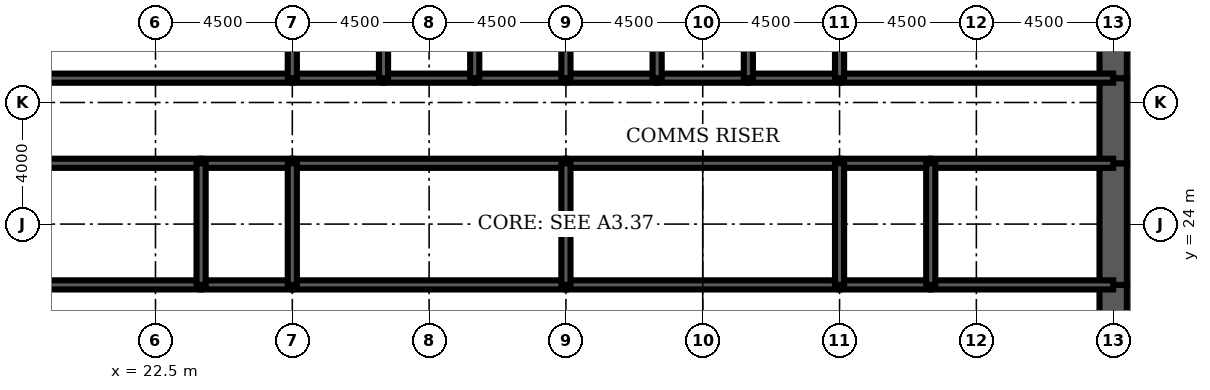
"""IFC4 building model, lengths in metres.
Left out: names, types, materials, properties, quantities, classifications, styles, units other than length and angle.
Written with IfcOpenShell. Run it as: python <this file> out.ifc"""

import sys

from ifc_helpers import new_model, si_unit, direction, frame, frame_2d, origin, place, context, subcontext, project, spatial, rectangle, extrude, element, fill, save


model = new_model("IFC4")
c1 = context("Model", 3, precision=1e-05, world=origin(), true_north=direction((0.0, 1.0)))
c2 = subcontext(c1, "Body", "Model", "MODEL_VIEW")
j1 = project(units=[si_unit("LENGTHUNIT", "METRE"), si_unit("PLANEANGLEUNIT", "RADIAN")], contexts=[c1])
p1 = place(None, origin())
s1 = spatial("IfcSite", under=j1, at=p1, CompositionType="ELEMENT")
p2 = place(p1, origin())
s2 = spatial("IfcBuilding", under=s1, at=p2, CompositionType="ELEMENT")
p3 = place(p2, frame((0.0, 0.0, 159.3)))
s3 = spatial("IfcBuildingStorey", under=s2, at=p3, CompositionType="ELEMENT", Elevation=159.3)
p4 = place(p3, frame((54.0, 19.2, 0.0), z_axis=(0.0, 0.0, 1.0), x_axis=(0.0, 1.0, 0.0)))
e1 = element("IfcWall", 1, at=p4, inside=s3, PredefinedType="SHEAR", context=c2, shape_type="SweptSolid", body=[
    extrude(rectangle(XDim=2.8, YDim=0.9, at=frame_2d((1.4, 0.0))), origin(), (0.0, 0.0, 1.0), 4.2),
])
p5 = place(p4, frame((0.4, 0.0, 0.0)))
e2 = element("IfcOpeningElement", 2, at=p5, cuts=e1, PredefinedType="OPENING", context=c2, shape_type="SweptSolid", body=[
    extrude(rectangle(XDim=1.8, YDim=2.1, at=frame_2d((0.9, 1.05))), frame((0.0, 0.46, 0.0), z_axis=(0.0, -1.0, 0.0), x_axis=(1.0, 0.0, 0.0)), (0.0, 0.0, 1.0), 0.92),
])
p6 = place(p3, frame((54.0, 22.0, 0.0), z_axis=(0.0, 0.0, 1.0), x_axis=(0.0, 1.0, 0.0)))
e3 = element("IfcWall", 3, at=p6, inside=s3, PredefinedType="SHEAR", context=c2, shape_type="SweptSolid", body=[
    extrude(rectangle(XDim=4.0, YDim=0.9, at=frame_2d((2.0, 0.0))), origin(), (0.0, 0.0, 1.0), 4.2),
])
p7 = place(p3, frame((54.0, 26.0, 0.0), z_axis=(0.0, 0.0, 1.0), x_axis=(0.0, 1.0, 0.0)))
e4 = element("IfcWall", 4, at=p7, inside=s3, PredefinedType="SHEAR", context=c2, shape_type="SweptSolid", body=[
    extrude(rectangle(XDim=2.8, YDim=0.9, at=frame_2d((1.4, 0.0))), origin(), (0.0, 0.0, 1.0), 4.2),
])
p8 = place(p7, frame((0.6, 0.0, 0.0)))
e5 = element("IfcOpeningElement", 5, at=p8, cuts=e4, PredefinedType="OPENING", context=c2, shape_type="SweptSolid", body=[
    extrude(rectangle(XDim=1.8, YDim=2.1, at=frame_2d((0.9, 1.05))), frame((0.0, 0.46, 0.0), z_axis=(0.0, -1.0, 0.0), x_axis=(1.0, 0.0, 0.0)), (0.0, 0.0, 1.0), 0.92),
])
p9 = place(p3, frame((54.0, 28.8, 0.0), z_axis=(0.0, 0.0, 1.0), x_axis=(0.0, 1.0, 0.0)))
e6 = element("IfcWall", 6, at=p9, inside=s3, PredefinedType="SHEAR", context=c2, shape_type="SweptSolid", body=[
    extrude(rectangle(XDim=3.2, YDim=0.9, at=frame_2d((1.6, 0.0))), origin(), (0.0, 0.0, 1.0), 4.2),
])
p10 = place(p3, frame((18.0, 28.8, 0.0), z_axis=(0.0, 0.0, 1.0), x_axis=(1.0, 0.0, 0.0)))
e7 = element("IfcWall", 7, at=p10, inside=s3, PredefinedType="SOLIDWALL", context=c2, shape_type="SweptSolid", body=[
    extrude(rectangle(XDim=9.0, YDim=0.3, at=frame_2d((4.5, 0.0))), origin(), (0.0, 0.0, 1.0), 4.2),
])
p11 = place(p10, frame((0.65, 0.0, 0.0)))
e8 = element("IfcOpeningElement", 8, at=p11, cuts=e7, PredefinedType="OPENING", context=c2, shape_type="SweptSolid", body=[
    extrude(rectangle(XDim=1.0, YDim=2.1, at=frame_2d((0.5, 1.05))), frame((0.0, 0.16, 0.0), z_axis=(0.0, -1.0, 0.0), x_axis=(1.0, 0.0, 0.0)), (0.0, 0.0, 1.0), 0.32),
])
p12 = place(p3, frame((27.0, 28.8, 0.0), z_axis=(0.0, 0.0, 1.0), x_axis=(1.0, 0.0, 0.0)))
e9 = element("IfcWall", 9, at=p12, inside=s3, PredefinedType="SOLIDWALL", context=c2, shape_type="SweptSolid", body=[
    extrude(rectangle(XDim=3.0, YDim=0.3, at=frame_2d((1.5, 0.0))), origin(), (0.0, 0.0, 1.0), 4.2),
])
p13 = place(p12, frame((0.95, 0.0, 0.0)))
e10 = element("IfcOpeningElement", 10, at=p13, cuts=e9, PredefinedType="OPENING", context=c2, shape_type="SweptSolid", body=[
    extrude(rectangle(XDim=1.1, YDim=2.2, at=frame_2d((0.55, 1.1))), frame((0.0, 0.16, 0.0), z_axis=(0.0, -1.0, 0.0), x_axis=(1.0, 0.0, 0.0)), (0.0, 0.0, 1.0), 0.32),
])
p14 = place(p3, frame((30.0, 28.8, 0.0), z_axis=(0.0, 0.0, 1.0), x_axis=(1.0, 0.0, 0.0)))
e11 = element("IfcWall", 11, at=p14, inside=s3, PredefinedType="SOLIDWALL", context=c2, shape_type="SweptSolid", body=[
    extrude(rectangle(XDim=3.0, YDim=0.3, at=frame_2d((1.5, 0.0))), origin(), (0.0, 0.0, 1.0), 4.2),
])
p15 = place(p14, frame((0.95, 0.0, 0.0)))
e12 = element("IfcOpeningElement", 12, at=p15, cuts=e11, PredefinedType="OPENING", context=c2, shape_type="SweptSolid", body=[
    extrude(rectangle(XDim=1.1, YDim=2.2, at=frame_2d((0.55, 1.1))), frame((0.0, 0.16, 0.0), z_axis=(0.0, -1.0, 0.0), x_axis=(1.0, 0.0, 0.0)), (0.0, 0.0, 1.0), 0.32),
])
p16 = place(p3, frame((33.0, 28.8, 0.0), z_axis=(0.0, 0.0, 1.0), x_axis=(1.0, 0.0, 0.0)))
e13 = element("IfcWall", 13, at=p16, inside=s3, PredefinedType="SOLIDWALL", context=c2, shape_type="SweptSolid", body=[
    extrude(rectangle(XDim=3.0, YDim=0.3, at=frame_2d((1.5, 0.0))), origin(), (0.0, 0.0, 1.0), 4.2),
])
p17 = place(p16, frame((0.95, 0.0, 0.0)))
e14 = element("IfcOpeningElement", 14, at=p17, cuts=e13, PredefinedType="OPENING", context=c2, shape_type="SweptSolid", body=[
    extrude(rectangle(XDim=1.1, YDim=2.2, at=frame_2d((0.55, 1.1))), frame((0.0, 0.16, 0.0), z_axis=(0.0, -1.0, 0.0), x_axis=(1.0, 0.0, 0.0)), (0.0, 0.0, 1.0), 0.32),
])
for number, where, z_axis, x_axis in (
    (15, (36.0, 28.8, 0.0), (0.0, 0.0, 1.0), (1.0, 0.0, 0.0)),
    (16, (39.0, 28.8, 0.0), (0.0, 0.0, 1.0), (1.0, 0.0, 0.0)),
):
    element("IfcWall", number, at=place(p3, frame(where, z_axis=z_axis, x_axis=x_axis)), inside=s3, PredefinedType="SOLIDWALL", context=c2, shape_type="SweptSolid", body=[
        extrude(rectangle(XDim=3.0, YDim=0.3, at=frame_2d((1.5, 0.0))), origin(), (0.0, 0.0, 1.0), 4.2),
    ])
p18 = place(p3, frame((42.0, 28.8, 0.0), z_axis=(0.0, 0.0, 1.0), x_axis=(1.0, 0.0, 0.0)))
e17 = element("IfcWall", 17, at=p18, inside=s3, PredefinedType="SOLIDWALL", context=c2, shape_type="SweptSolid", body=[
    extrude(rectangle(XDim=3.0, YDim=0.3, at=frame_2d((1.5, 0.0))), origin(), (0.0, 0.0, 1.0), 4.2),
])
p19 = place(p18, frame((0.95, 0.0, 0.0)))
e18 = element("IfcOpeningElement", 18, at=p19, cuts=e17, PredefinedType="OPENING", context=c2, shape_type="SweptSolid", body=[
    extrude(rectangle(XDim=1.1, YDim=2.2, at=frame_2d((0.55, 1.1))), frame((0.0, 0.16, 0.0), z_axis=(0.0, -1.0, 0.0), x_axis=(1.0, 0.0, 0.0)), (0.0, 0.0, 1.0), 0.32),
])
p20 = place(p3, frame((45.0, 28.8, 0.0), z_axis=(0.0, 0.0, 1.0), x_axis=(1.0, 0.0, 0.0)))
e19 = element("IfcWall", 19, at=p20, inside=s3, PredefinedType="SOLIDWALL", context=c2, shape_type="SweptSolid", body=[
    extrude(rectangle(XDim=9.0, YDim=0.3, at=frame_2d((4.5, 0.0))), origin(), (0.0, 0.0, 1.0), 4.2),
])
p21 = place(p20, frame((7.35, 0.0, 0.0)))
e20 = element("IfcOpeningElement", 20, at=p21, cuts=e19, PredefinedType="OPENING", context=c2, shape_type="SweptSolid", body=[
    extrude(rectangle(XDim=1.0, YDim=2.1, at=frame_2d((0.5, 1.05))), frame((0.0, 0.16, 0.0), z_axis=(0.0, -1.0, 0.0), x_axis=(1.0, 0.0, 0.0)), (0.0, 0.0, 1.0), 0.32),
])
p22 = place(p3, frame((18.0, 22.0, 0.0), z_axis=(0.0, 0.0, 1.0), x_axis=(1.0, 0.0, 0.0)))
e21 = element("IfcWall", 21, at=p22, inside=s3, PredefinedType="SOLIDWALL", context=c2, shape_type="SweptSolid", body=[
    extrude(rectangle(XDim=6.0, YDim=0.3, at=frame_2d((3.0, 0.0))), origin(), (0.0, 0.0, 1.0), 4.2),
])
p23 = place(p22, frame((4.4, 0.0, 0.0)))
e22 = element("IfcOpeningElement", 22, at=p23, cuts=e21, PredefinedType="OPENING", context=c2, shape_type="SweptSolid", body=[
    extrude(rectangle(XDim=1.0, YDim=2.1, at=frame_2d((0.5, 1.05))), frame((0.0, 0.16, 0.0), z_axis=(0.0, -1.0, 0.0), x_axis=(1.0, 0.0, 0.0)), (0.0, 0.0, 1.0), 0.32),
])
p24 = place(p22, frame((0.7, 0.0, 0.0)))
e23 = element("IfcOpeningElement", 23, at=p24, cuts=e21, PredefinedType="OPENING", context=c2, shape_type="SweptSolid", body=[
    extrude(rectangle(XDim=1.0, YDim=2.1, at=frame_2d((0.5, 1.05))), frame((0.0, 0.16, 0.0), z_axis=(0.0, -1.0, 0.0), x_axis=(1.0, 0.0, 0.0)), (0.0, 0.0, 1.0), 0.32),
])
p25 = place(p3, frame((24.0, 22.0, 0.0), z_axis=(0.0, 0.0, 1.0), x_axis=(1.0, 0.0, 0.0)))
e24 = element("IfcWall", 24, at=p25, inside=s3, PredefinedType="SOLIDWALL", context=c2, shape_type="SweptSolid", body=[
    extrude(rectangle(XDim=3.0, YDim=0.3, at=frame_2d((1.5, 0.0))), origin(), (0.0, 0.0, 1.0), 4.2),
])
p26 = place(p25, frame((1.0, 0.0, 0.0)))
e25 = element("IfcOpeningElement", 25, at=p26, cuts=e24, PredefinedType="OPENING", context=c2, shape_type="SweptSolid", body=[
    extrude(rectangle(XDim=1.0, YDim=2.1, at=frame_2d((0.5, 1.05))), frame((0.0, 0.16, 0.0), z_axis=(0.0, -1.0, 0.0), x_axis=(1.0, 0.0, 0.0)), (0.0, 0.0, 1.0), 0.32),
])
p27 = place(p3, frame((27.0, 22.0, 0.0), z_axis=(0.0, 0.0, 1.0), x_axis=(1.0, 0.0, 0.0)))
e26 = element("IfcWall", 26, at=p27, inside=s3, PredefinedType="SOLIDWALL", context=c2, shape_type="SweptSolid", body=[
    extrude(rectangle(XDim=9.0, YDim=0.3, at=frame_2d((4.5, 0.0))), origin(), (0.0, 0.0, 1.0), 4.2),
])
p28 = place(p27, frame((4.0, 0.0, 0.0)))
e27 = element("IfcOpeningElement", 27, at=p28, cuts=e26, PredefinedType="OPENING", context=c2, shape_type="SweptSolid", body=[
    extrude(rectangle(XDim=1.0, YDim=2.1, at=frame_2d((0.5, 1.05))), frame((0.0, 0.16, 0.0), z_axis=(0.0, -1.0, 0.0), x_axis=(1.0, 0.0, 0.0)), (0.0, 0.0, 1.0), 0.32),
])
p29 = place(p3, frame((36.0, 22.0, 0.0), z_axis=(0.0, 0.0, 1.0), x_axis=(1.0, 0.0, 0.0)))
e28 = element("IfcWall", 28, at=p29, inside=s3, PredefinedType="SOLIDWALL", context=c2, shape_type="SweptSolid", body=[
    extrude(rectangle(XDim=9.0, YDim=0.3, at=frame_2d((4.5, 0.0))), origin(), (0.0, 0.0, 1.0), 4.2),
])
p30 = place(p29, frame((4.0, 0.0, 0.0)))
e29 = element("IfcOpeningElement", 29, at=p30, cuts=e28, PredefinedType="OPENING", context=c2, shape_type="SweptSolid", body=[
    extrude(rectangle(XDim=1.0, YDim=2.1, at=frame_2d((0.5, 1.05))), frame((0.0, 0.16, 0.0), z_axis=(0.0, -1.0, 0.0), x_axis=(1.0, 0.0, 0.0)), (0.0, 0.0, 1.0), 0.32),
])
p31 = place(p3, frame((45.0, 22.0, 0.0), z_axis=(0.0, 0.0, 1.0), x_axis=(1.0, 0.0, 0.0)))
e30 = element("IfcWall", 30, at=p31, inside=s3, PredefinedType="SOLIDWALL", context=c2, shape_type="SweptSolid", body=[
    extrude(rectangle(XDim=3.0, YDim=0.3, at=frame_2d((1.5, 0.0))), origin(), (0.0, 0.0, 1.0), 4.2),
])
p32 = place(p31, frame((1.0, 0.0, 0.0)))
e31 = element("IfcOpeningElement", 31, at=p32, cuts=e30, PredefinedType="OPENING", context=c2, shape_type="SweptSolid", body=[
    extrude(rectangle(XDim=1.0, YDim=2.1, at=frame_2d((0.5, 1.05))), frame((0.0, 0.16, 0.0), z_axis=(0.0, -1.0, 0.0), x_axis=(1.0, 0.0, 0.0)), (0.0, 0.0, 1.0), 0.32),
])
p33 = place(p3, frame((48.0, 22.0, 0.0), z_axis=(0.0, 0.0, 1.0), x_axis=(1.0, 0.0, 0.0)))
e32 = element("IfcWall", 32, at=p33, inside=s3, PredefinedType="SOLIDWALL", context=c2, shape_type="SweptSolid", body=[
    extrude(rectangle(XDim=6.0, YDim=0.3, at=frame_2d((3.0, 0.0))), origin(), (0.0, 0.0, 1.0), 4.2),
])
p34 = place(p33, frame((2.0, 0.0, 0.0)))
e33 = element("IfcOpeningElement", 33, at=p34, cuts=e32, PredefinedType="OPENING", context=c2, shape_type="SweptSolid", body=[
    extrude(rectangle(XDim=1.0, YDim=2.1, at=frame_2d((0.5, 1.05))), frame((0.0, 0.16, 0.0), z_axis=(0.0, -1.0, 0.0), x_axis=(1.0, 0.0, 0.0)), (0.0, 0.0, 1.0), 0.32),
])
p35 = place(p33, frame((4.0, 0.0, 0.0)))
e34 = element("IfcOpeningElement", 34, at=p35, cuts=e32, PredefinedType="OPENING", context=c2, shape_type="SweptSolid", body=[
    extrude(rectangle(XDim=1.0, YDim=2.1, at=frame_2d((0.5, 1.05))), frame((0.0, 0.16, 0.0), z_axis=(0.0, -1.0, 0.0), x_axis=(1.0, 0.0, 0.0)), (0.0, 0.0, 1.0), 0.32),
])
p36 = place(p3, frame((18.0, 26.0, 0.0), z_axis=(0.0, 0.0, 1.0), x_axis=(1.0, 0.0, 0.0)))
e35 = element("IfcWall", 35, at=p36, inside=s3, PredefinedType="SOLIDWALL", context=c2, shape_type="SweptSolid", body=[
    extrude(rectangle(XDim=6.0, YDim=0.3, at=frame_2d((3.0, 0.0))), origin(), (0.0, 0.0, 1.0), 4.2),
])
p37 = place(p3, frame((24.0, 26.0, 0.0), z_axis=(0.0, 0.0, 1.0), x_axis=(1.0, 0.0, 0.0)))
e36 = element("IfcWall", 36, at=p37, inside=s3, PredefinedType="SOLIDWALL", context=c2, shape_type="SweptSolid", body=[
    extrude(rectangle(XDim=3.0, YDim=0.3, at=frame_2d((1.5, 0.0))), origin(), (0.0, 0.0, 1.0), 4.2),
])
for number, where, z_axis, x_axis in (
    (37, (27.0, 26.0, 0.0), (0.0, 0.0, 1.0), (1.0, 0.0, 0.0)),
    (38, (36.0, 26.0, 0.0), (0.0, 0.0, 1.0), (1.0, 0.0, 0.0)),
):
    element("IfcWall", number, at=place(p3, frame(where, z_axis=z_axis, x_axis=x_axis)), inside=s3, PredefinedType="SOLIDWALL", context=c2, shape_type="SweptSolid", body=[
        extrude(rectangle(XDim=9.0, YDim=0.3, at=frame_2d((4.5, 0.0))), origin(), (0.0, 0.0, 1.0), 4.2),
    ])
p38 = place(p3, frame((45.0, 26.0, 0.0), z_axis=(0.0, 0.0, 1.0), x_axis=(1.0, 0.0, 0.0)))
e39 = element("IfcWall", 39, at=p38, inside=s3, PredefinedType="SOLIDWALL", context=c2, shape_type="SweptSolid", body=[
    extrude(rectangle(XDim=3.0, YDim=0.3, at=frame_2d((1.5, 0.0))), origin(), (0.0, 0.0, 1.0), 4.2),
])
p39 = place(p3, frame((48.0, 26.0, 0.0), z_axis=(0.0, 0.0, 1.0), x_axis=(1.0, 0.0, 0.0)))
e40 = element("IfcWall", 40, at=p39, inside=s3, PredefinedType="SOLIDWALL", context=c2, shape_type="SweptSolid", body=[
    extrude(rectangle(XDim=6.0, YDim=0.3, at=frame_2d((3.0, 0.0))), origin(), (0.0, 0.0, 1.0), 4.2),
])
for number, where, z_axis, x_axis in (
    (41, (27.0, 28.8, 0.0), (0.0, 0.0, 1.0), (0.0, 1.0, 0.0)),
    (42, (30.0, 28.8, 0.0), (0.0, 0.0, 1.0), (0.0, 1.0, 0.0)),
    (43, (33.0, 28.8, 0.0), (0.0, 0.0, 1.0), (0.0, 1.0, 0.0)),
    (44, (36.0, 28.8, 0.0), (0.0, 0.0, 1.0), (0.0, 1.0, 0.0)),
    (45, (39.0, 28.8, 0.0), (0.0, 0.0, 1.0), (0.0, 1.0, 0.0)),
    (46, (42.0, 28.8, 0.0), (0.0, 0.0, 1.0), (0.0, 1.0, 0.0)),
    (47, (45.0, 28.8, 0.0), (0.0, 0.0, 1.0), (0.0, 1.0, 0.0)),
):
    element("IfcWall", number, at=place(p3, frame(where, z_axis=z_axis, x_axis=x_axis)), inside=s3, PredefinedType="SOLIDWALL", context=c2, shape_type="SweptSolid", body=[
        extrude(rectangle(XDim=3.2, YDim=0.3, at=frame_2d((1.6, 0.0))), origin(), (0.0, 0.0, 1.0), 4.2),
    ])
for number, where, z_axis, x_axis in (
    (48, (24.0, 22.0, 0.0), (0.0, 0.0, 1.0), (0.0, 1.0, 0.0)),
    (49, (27.0, 22.0, 0.0), (0.0, 0.0, 1.0), (0.0, 1.0, 0.0)),
    (50, (36.0, 22.0, 0.0), (0.0, 0.0, 1.0), (0.0, 1.0, 0.0)),
    (51, (45.0, 22.0, 0.0), (0.0, 0.0, 1.0), (0.0, 1.0, 0.0)),
    (52, (48.0, 22.0, 0.0), (0.0, 0.0, 1.0), (0.0, 1.0, 0.0)),
):
    element("IfcWall", number, at=place(p3, frame(where, z_axis=z_axis, x_axis=x_axis)), inside=s3, PredefinedType="SOLIDWALL", context=c2, shape_type="SweptSolid", body=[
        extrude(rectangle(XDim=4.0, YDim=0.3, at=frame_2d((2.0, 0.0))), origin(), (0.0, 0.0, 1.0), 4.2),
    ])
for number, where, z_axis, x_axis in (
    (53, (20.025, 22.15, 0.0), (0.0, 0.0, 1.0), (0.0, 1.0, 0.0)),
    (54, (51.375, 22.15, 0.0), (0.0, 0.0, 1.0), (0.0, 1.0, 0.0)),
):
    element("IfcWall", number, at=place(p3, frame(where, z_axis=z_axis, x_axis=x_axis)), inside=s3, PredefinedType="PARTITIONING", context=c2, shape_type="SweptSolid", body=[
        extrude(rectangle(XDim=3.7, YDim=0.15, at=frame_2d((1.85, 0.0))), origin(), (0.0, 0.0, 1.0), 3.0),
    ])
p40 = place(p3, frame((23.7, 26.15, 0.0), z_axis=(0.0, 0.0, 1.0), x_axis=(0.0, 1.0, 0.0)))
e55 = element("IfcWall", 55, at=p40, inside=s3, PredefinedType="PARTITIONING", context=c2, shape_type="SweptSolid", body=[
    extrude(rectangle(XDim=2.5, YDim=0.15, at=frame_2d((1.25, 0.0))), origin(), (0.0, 0.0, 1.0), 3.0),
])
p41 = place(p40, frame((0.35, 0.0, 0.0)))
e56 = element("IfcOpeningElement", 56, at=p41, cuts=e55, PredefinedType="OPENING", context=c2, shape_type="SweptSolid", body=[
    extrude(rectangle(XDim=1.0, YDim=2.1, at=frame_2d((0.5, 1.05))), frame((0.0, 0.085, 0.0), z_axis=(0.0, -1.0, 0.0), x_axis=(1.0, 0.0, 0.0)), (0.0, 0.0, 1.0), 0.17),
])
p42 = place(p41, origin())
e57 = element("IfcDoor", 57, at=p42, inside=s3, OperationType="SINGLE_SWING_LEFT", PredefinedType="DOOR", context=c2, shape_type="SweptSolid", body=[
    extrude(rectangle(XDim=1.0, YDim=2.1, at=frame_2d((0.5, 1.05))), frame((0.0, 0.025, 0.0), z_axis=(0.0, -1.0, 0.0), x_axis=(1.0, 0.0, 0.0)), (0.0, 0.0, 1.0), 0.05),
])
fill(e56, e57)
p43 = place(p19, origin())
e58 = element("IfcDoor", 58, at=p43, inside=s3, OperationType="DOUBLE_DOOR_SLIDING", PredefinedType="USERDEFINED", context=c2, shape_type="SweptSolid", body=[
    extrude(rectangle(XDim=1.1, YDim=2.2, at=frame_2d((0.55, 1.1))), frame((0.0, 0.025, 0.0), z_axis=(0.0, -1.0, 0.0), x_axis=(1.0, 0.0, 0.0)), (0.0, 0.0, 1.0), 0.05),
])
fill(e18, e58)
p44 = place(p13, origin())
e59 = element("IfcDoor", 59, at=p44, inside=s3, OperationType="DOUBLE_DOOR_SLIDING", PredefinedType="USERDEFINED", context=c2, shape_type="SweptSolid", body=[
    extrude(rectangle(XDim=1.1, YDim=2.2, at=frame_2d((0.55, 1.1))), frame((0.0, 0.025, 0.0), z_axis=(0.0, -1.0, 0.0), x_axis=(1.0, 0.0, 0.0)), (0.0, 0.0, 1.0), 0.05),
])
fill(e10, e59)
p45 = place(p15, origin())
e60 = element("IfcDoor", 60, at=p45, inside=s3, OperationType="DOUBLE_DOOR_SLIDING", PredefinedType="USERDEFINED", context=c2, shape_type="SweptSolid", body=[
    extrude(rectangle(XDim=1.1, YDim=2.2, at=frame_2d((0.55, 1.1))), frame((0.0, 0.025, 0.0), z_axis=(0.0, -1.0, 0.0), x_axis=(1.0, 0.0, 0.0)), (0.0, 0.0, 1.0), 0.05),
])
fill(e12, e60)
p46 = place(p17, origin())
e61 = element("IfcDoor", 61, at=p46, inside=s3, OperationType="DOUBLE_DOOR_SLIDING", PredefinedType="USERDEFINED", context=c2, shape_type="SweptSolid", body=[
    extrude(rectangle(XDim=1.1, YDim=2.2, at=frame_2d((0.55, 1.1))), frame((0.0, 0.025, 0.0), z_axis=(0.0, -1.0, 0.0), x_axis=(1.0, 0.0, 0.0)), (0.0, 0.0, 1.0), 0.05),
])
fill(e14, e61)
p47 = place(p11, origin())
e62 = element("IfcDoor", 62, at=p47, inside=s3, OperationType="SINGLE_SWING_LEFT", PredefinedType="DOOR", context=c2, shape_type="SweptSolid", body=[
    extrude(rectangle(XDim=1.0, YDim=2.1, at=frame_2d((0.5, 1.05))), frame((0.0, 0.025, 0.0), z_axis=(0.0, -1.0, 0.0), x_axis=(1.0, 0.0, 0.0)), (0.0, 0.0, 1.0), 0.05),
])
fill(e8, e62)
p48 = place(p21, origin())
e63 = element("IfcDoor", 63, at=p48, inside=s3, OperationType="SINGLE_SWING_RIGHT", PredefinedType="DOOR", context=c2, shape_type="SweptSolid", body=[
    extrude(rectangle(XDim=1.0, YDim=2.1, at=frame_2d((0.5, 1.05))), frame((0.0, 0.025, 0.0), z_axis=(0.0, -1.0, 0.0), x_axis=(1.0, 0.0, 0.0)), (0.0, 0.0, 1.0), 0.05),
])
fill(e20, e63)
p49 = place(p5, origin())
e64 = element("IfcDoor", 64, at=p49, inside=s3, OperationType="SINGLE_SWING_LEFT", PredefinedType="DOOR", context=c2, shape_type="SweptSolid", body=[
    extrude(rectangle(XDim=1.8, YDim=2.1, at=frame_2d((0.9, 1.05))), frame((0.0, 0.45, 0.0), z_axis=(0.0, -1.0, 0.0), x_axis=(1.0, 0.0, 0.0)), (0.0, 0.0, 1.0), 0.899),
])
fill(e2, e64)
p50 = place(p8, origin())
e65 = element("IfcDoor", 65, at=p50, inside=s3, OperationType="SINGLE_SWING_LEFT", PredefinedType="DOOR", context=c2, shape_type="SweptSolid", body=[
    extrude(rectangle(XDim=1.8, YDim=2.1, at=frame_2d((0.9, 1.05))), frame((0.0, 0.45, 0.0), z_axis=(0.0, -1.0, 0.0), x_axis=(1.0, 0.0, 0.0)), (0.0, 0.0, 1.0), 0.899),
])
fill(e5, e65)
p51 = place(p23, origin())
e66 = element("IfcDoor", 66, at=p51, inside=s3, OperationType="SINGLE_SWING_RIGHT", PredefinedType="DOOR", context=c2, shape_type="SweptSolid", body=[
    extrude(rectangle(XDim=1.0, YDim=2.1, at=frame_2d((0.5, 1.05))), frame((0.0, 0.025, 0.0), z_axis=(0.0, -1.0, 0.0), x_axis=(1.0, 0.0, 0.0)), (0.0, 0.0, 1.0), 0.05),
])
fill(e22, e66)
p52 = place(p26, origin())
e67 = element("IfcDoor", 67, at=p52, inside=s3, OperationType="SINGLE_SWING_LEFT", PredefinedType="DOOR", context=c2, shape_type="SweptSolid", body=[
    extrude(rectangle(XDim=1.0, YDim=2.1, at=frame_2d((0.5, 1.05))), frame((0.0, 0.025, 0.0), z_axis=(0.0, -1.0, 0.0), x_axis=(1.0, 0.0, 0.0)), (0.0, 0.0, 1.0), 0.05),
])
fill(e25, e67)
p53 = place(p28, origin())
e68 = element("IfcDoor", 68, at=p53, inside=s3, OperationType="SINGLE_SWING_LEFT", PredefinedType="DOOR", context=c2, shape_type="SweptSolid", body=[
    extrude(rectangle(XDim=1.0, YDim=2.1, at=frame_2d((0.5, 1.05))), frame((0.0, 0.025, 0.0), z_axis=(0.0, -1.0, 0.0), x_axis=(1.0, 0.0, 0.0)), (0.0, 0.0, 1.0), 0.05),
])
fill(e27, e68)
p54 = place(p30, origin())
e69 = element("IfcDoor", 69, at=p54, inside=s3, OperationType="SINGLE_SWING_LEFT", PredefinedType="DOOR", context=c2, shape_type="SweptSolid", body=[
    extrude(rectangle(XDim=1.0, YDim=2.1, at=frame_2d((0.5, 1.05))), frame((0.0, 0.025, 0.0), z_axis=(0.0, -1.0, 0.0), x_axis=(1.0, 0.0, 0.0)), (0.0, 0.0, 1.0), 0.05),
])
fill(e29, e69)
p55 = place(p32, origin())
e70 = element("IfcDoor", 70, at=p55, inside=s3, OperationType="SINGLE_SWING_LEFT", PredefinedType="DOOR", context=c2, shape_type="SweptSolid", body=[
    extrude(rectangle(XDim=1.0, YDim=2.1, at=frame_2d((0.5, 1.05))), frame((0.0, 0.025, 0.0), z_axis=(0.0, -1.0, 0.0), x_axis=(1.0, 0.0, 0.0)), (0.0, 0.0, 1.0), 0.05),
])
fill(e31, e70)
p56 = place(p34, origin())
e71 = element("IfcDoor", 71, at=p56, inside=s3, OperationType="SINGLE_SWING_LEFT", PredefinedType="DOOR", context=c2, shape_type="SweptSolid", body=[
    extrude(rectangle(XDim=1.0, YDim=2.1, at=frame_2d((0.5, 1.05))), frame((0.0, 0.025, 0.0), z_axis=(0.0, -1.0, 0.0), x_axis=(1.0, 0.0, 0.0)), (0.0, 0.0, 1.0), 0.05),
])
fill(e33, e71)
p57 = place(p24, origin())
e72 = element("IfcDoor", 72, at=p57, inside=s3, OperationType="SINGLE_SWING_LEFT", PredefinedType="DOOR", context=c2, shape_type="SweptSolid", body=[
    extrude(rectangle(XDim=1.0, YDim=2.1, at=frame_2d((0.5, 1.05))), frame((0.0, 0.025, 0.0), z_axis=(0.0, -1.0, 0.0), x_axis=(1.0, 0.0, 0.0)), (0.0, 0.0, 1.0), 0.05),
])
fill(e23, e72)
p58 = place(p35, origin())
e73 = element("IfcDoor", 73, at=p58, inside=s3, OperationType="SINGLE_SWING_RIGHT", PredefinedType="DOOR", context=c2, shape_type="SweptSolid", body=[
    extrude(rectangle(XDim=1.0, YDim=2.1, at=frame_2d((0.5, 1.05))), frame((0.0, 0.025, 0.0), z_axis=(0.0, -1.0, 0.0), x_axis=(1.0, 0.0, 0.0)), (0.0, 0.0, 1.0), 0.05),
])
fill(e34, e73)
save(model, sys.argv[1])
